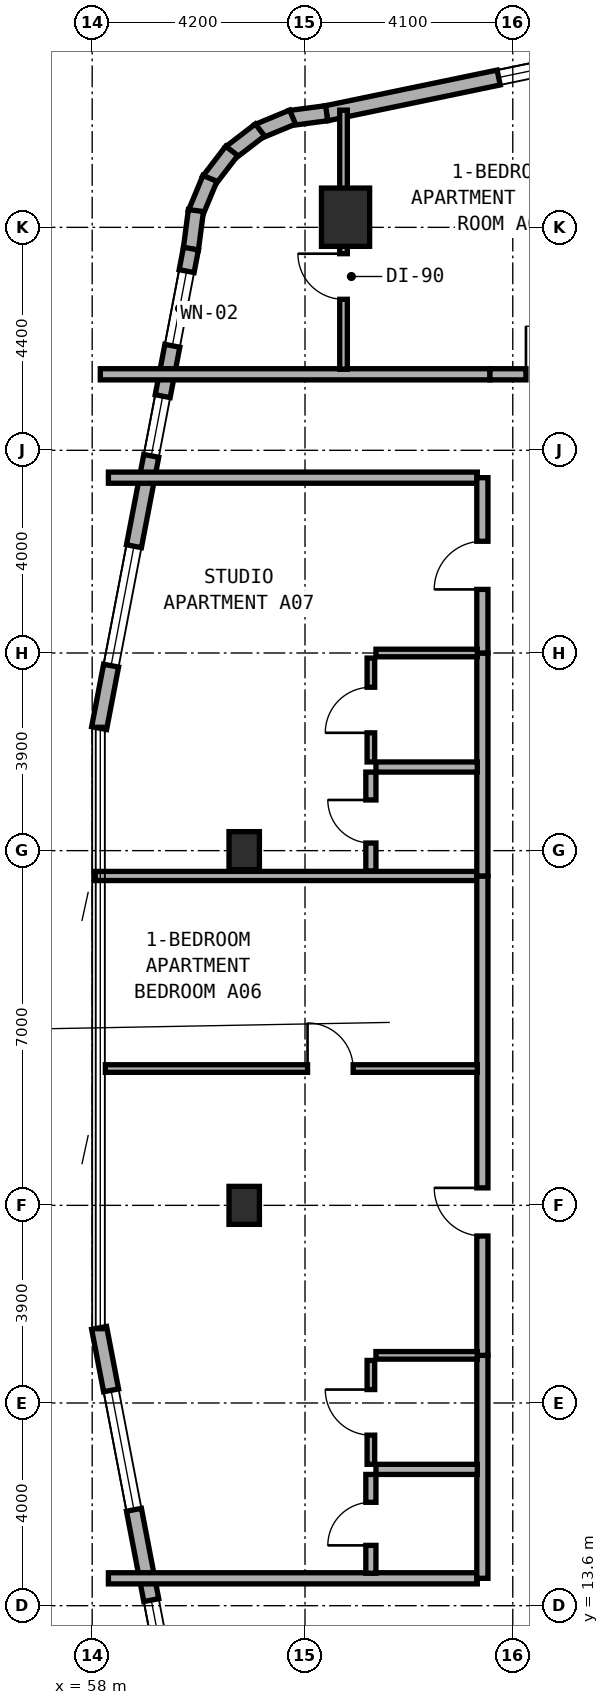
"""IFC4 building model, lengths in metres.
Left out: names, types, materials, properties, quantities, classifications, styles, units other than length and angle.
Written with IfcOpenShell. Run it as: python <this file> out.ifc"""

import sys

from ifc_helpers import new_model, si_unit, direction, frame, frame_2d, origin, origin_2d, place, context, subcontext, project, spatial, rectangle, extrude, element, fill, save


model = new_model("IFC4")
c1 = context("Model", 3, precision=1e-05, world=origin(), true_north=direction((0.0, 1.0)))
c2 = subcontext(c1, "Body", "Model", "MODEL_VIEW")
j1 = project(units=[si_unit("LENGTHUNIT", "METRE"), si_unit("PLANEANGLEUNIT", "RADIAN")], contexts=[c1])
p1 = place(None, origin())
s1 = spatial("IfcSite", under=j1, at=p1, CompositionType="ELEMENT")
p2 = place(p1, origin())
s2 = spatial("IfcBuilding", under=s1, at=p2, CompositionType="ELEMENT")
p3 = place(p2, frame((0.0, 0.0, 73.0)))
s3 = spatial("IfcBuildingStorey", under=s2, at=p3, CompositionType="ELEMENT", Elevation=73.0)
for number, where, z_axis, x_axis in (
    (1, (61.0, 21.5, 0.0), (0.0, 0.0, 1.0), (1.0, 0.0, 0.0)),
    (2, (61.0, 28.5, 0.0), (0.0, 0.0, 1.0), (1.0, 0.0, 0.0)),
):
    element("IfcColumn", number, at=place(p3, frame(where, z_axis=z_axis, x_axis=x_axis)), inside=s3, PredefinedType="COLUMN", context=c2, shape_type="SweptSolid", body=[
        extrude(rectangle(XDim=0.6, YDim=0.75, at=origin_2d()), origin(), (0.0, 0.0, 1.0), 3.5),
    ])
p4 = place(p3, frame((63.0, 41.0, 0.0), z_axis=(0.0, 0.0, 1.0), x_axis=(1.0, 0.0, 0.0)))
e3 = element("IfcColumn", 3, at=p4, inside=s3, PredefinedType="COLUMN", context=c2, shape_type="SweptSolid", body=[
    extrude(rectangle(XDim=0.95, YDim=1.15, at=origin_2d()), origin(), (0.0, 0.0, 1.0), 3.5),
])
p5 = place(p3, frame((71.356, 44.864, 0.0), z_axis=(0.0, 0.0, 1.0), x_axis=(-0.979127260729, -0.203248142175, 0.0)))
e4 = element("IfcWall", 4, at=p5, inside=s3, PredefinedType="STANDARD", context=c2, shape_type="SweptSolid", body=[
    extrude(rectangle(XDim=8.92, YDim=0.3, at=frame_2d((4.46, 0.0))), origin(), (0.0, 0.0, 1.0), 3.25),
])
p6 = place(p5, frame((3.048, 0.0, 0.8)))
e5 = element("IfcOpeningElement", 5, at=p6, cuts=e4, PredefinedType="OPENING", context=c2, shape_type="SweptSolid", body=[
    extrude(rectangle(XDim=2.4, YDim=1.6, at=frame_2d((1.2, 0.8))), frame((0.0, 0.16, 0.0), z_axis=(0.0, -1.0, 0.0), x_axis=(1.0, 0.0, 0.0)), (0.0, 0.0, 1.0), 0.32),
])
p7 = place(p3, frame((62.627, 43.052, 0.0), z_axis=(0.0, 0.0, 1.0), x_axis=(-0.991480488834, -0.130255288807, 0.0)))
e6 = element("IfcWall", 6, at=p7, inside=s3, PredefinedType="STANDARD", context=c2, shape_type="SweptSolid", body=[
    extrude(rectangle(XDim=0.729, YDim=0.3, at=frame_2d((0.365, 0.0))), origin(), (0.0, 0.0, 1.0), 3.25),
])
for number, where, z_axis, x_axis in (
    (7, (61.955, 42.976, 0.0), (0.0, 0.0, 1.0), (-0.924, -0.384, 0.0)),
    (8, (61.311, 42.721, 0.0), (0.0, 0.0, 1.0), (-0.794, -0.608, 0.0)),
    (9, (60.754, 42.309, 0.0), (0.0, 0.0, 1.0), (-0.608, -0.794, 0.0)),
    (10, (60.324, 41.766, 0.0), (0.0, 0.0, 1.0), (-0.383, -0.924, 0.0)),
):
    element("IfcWall", number, at=place(p3, frame(where, z_axis=z_axis, x_axis=x_axis)), inside=s3, PredefinedType="STANDARD", context=c2, shape_type="SweptSolid", body=[
        extrude(rectangle(XDim=0.746, YDim=0.3, at=frame_2d((0.373, 0.0))), origin(), (0.0, 0.0, 1.0), 3.25),
    ])
p8 = place(p3, frame((60.047, 41.131, 0.0), z_axis=(0.0, 0.0, 1.0), x_axis=(-0.129653178221, -0.991559404866, 0.0)))
e11 = element("IfcWall", 11, at=p8, inside=s3, PredefinedType="STANDARD", context=c2, shape_type="SweptSolid", body=[
    extrude(rectangle(XDim=0.764, YDim=0.3, at=frame_2d((0.382, 0.0))), origin(), (0.0, 0.0, 1.0), 3.25),
])
p9 = place(p3, frame((59.949, 40.38, 0.0), z_axis=(0.0, 0.0, 1.0), x_axis=(-0.188087874316, -0.982152203854, 0.0)))
e12 = element("IfcWall", 12, at=p9, inside=s3, PredefinedType="STANDARD", context=c2, shape_type="SweptSolid", body=[
    extrude(rectangle(XDim=9.634, YDim=0.3, at=frame_2d((4.817, 0.0))), origin(), (0.0, 0.0, 1.0), 3.25),
])
p10 = place(p9, frame((0.452, 0.0, 0.85)))
e13 = element("IfcOpeningElement", 13, at=p10, cuts=e12, PredefinedType="OPENING", context=c2, shape_type="SweptSolid", body=[
    extrude(rectangle(XDim=1.5, YDim=1.5, at=frame_2d((0.75, 0.75))), frame((0.0, 0.16, 0.0), z_axis=(0.0, -1.0, 0.0), x_axis=(1.0, 0.0, 0.0)), (0.0, 0.0, 1.0), 0.32),
])
p11 = place(p9, frame((2.964, 0.0, 0.85)))
e14 = element("IfcOpeningElement", 14, at=p11, cuts=e12, PredefinedType="OPENING", context=c2, shape_type="SweptSolid", body=[
    extrude(rectangle(XDim=1.2, YDim=1.5, at=frame_2d((0.6, 0.75))), frame((0.0, 0.16, 0.0), z_axis=(0.0, -1.0, 0.0), x_axis=(1.0, 0.0, 0.0)), (0.0, 0.0, 1.0), 0.32),
])
p12 = place(p9, frame((5.979, 0.0, 0.8)))
e15 = element("IfcOpeningElement", 15, at=p12, cuts=e12, PredefinedType="OPENING", context=c2, shape_type="SweptSolid", body=[
    extrude(rectangle(XDim=2.4, YDim=1.6, at=frame_2d((1.2, 0.8))), frame((0.0, 0.16, 0.0), z_axis=(0.0, -1.0, 0.0), x_axis=(1.0, 0.0, 0.0)), (0.0, 0.0, 1.0), 0.32),
])
p13 = place(p3, frame((58.137, 19.082, 0.0), z_axis=(0.0, 0.0, 1.0), x_axis=(0.188087874316, -0.982152203854, 0.0)))
e16 = element("IfcWall", 16, at=p13, inside=s3, PredefinedType="STANDARD", context=c2, shape_type="SweptSolid", body=[
    extrude(rectangle(XDim=9.634, YDim=0.3, at=frame_2d((4.817, 0.0))), origin(), (0.0, 0.0, 1.0), 3.25),
])
p14 = place(p13, frame((1.255, 0.0, 0.8)))
e17 = element("IfcOpeningElement", 17, at=p14, cuts=e16, PredefinedType="OPENING", context=c2, shape_type="SweptSolid", body=[
    extrude(rectangle(XDim=2.4, YDim=1.6, at=frame_2d((1.2, 0.8))), frame((0.0, 0.16, 0.0), z_axis=(0.0, -1.0, 0.0), x_axis=(1.0, 0.0, 0.0)), (0.0, 0.0, 1.0), 0.32),
])
p15 = place(p13, frame((5.47, 0.0, 0.85)))
e18 = element("IfcOpeningElement", 18, at=p15, cuts=e16, PredefinedType="OPENING", context=c2, shape_type="SweptSolid", body=[
    extrude(rectangle(XDim=1.2, YDim=1.5, at=frame_2d((0.6, 0.75))), frame((0.0, 0.16, 0.0), z_axis=(0.0, -1.0, 0.0), x_axis=(1.0, 0.0, 0.0)), (0.0, 0.0, 1.0), 0.32),
])
p16 = place(p13, frame((7.682, 0.0, 0.85)))
e19 = element("IfcOpeningElement", 19, at=p16, cuts=e16, PredefinedType="OPENING", context=c2, shape_type="SweptSolid", body=[
    extrude(rectangle(XDim=1.5, YDim=1.5, at=frame_2d((0.75, 0.75))), frame((0.0, 0.16, 0.0), z_axis=(0.0, -1.0, 0.0), x_axis=(1.0, 0.0, 0.0)), (0.0, 0.0, 1.0), 0.32),
])
p17 = place(p3, frame((58.16, 37.9, 0.0), z_axis=(0.0, 0.0, 1.0), x_axis=(1.0, 0.0, 0.0)))
e20 = element("IfcWall", 20, at=p17, inside=s3, PredefinedType="SOLIDWALL", context=c2, shape_type="SweptSolid", body=[
    extrude(rectangle(XDim=7.69, YDim=0.22, at=frame_2d((3.845, 0.0))), origin(), (0.0, 0.0, 1.0), 2.865),
])
p18 = place(p3, frame((65.85, 37.9, 0.0), z_axis=(0.0, 0.0, 1.0), x_axis=(1.0, 0.0, 0.0)))
e21 = element("IfcWall", 21, at=p18, inside=s3, PredefinedType="SOLIDWALL", context=c2, shape_type="SweptSolid", body=[
    extrude(rectangle(XDim=2.37, YDim=0.22, at=frame_2d((1.185, 0.0))), origin(), (0.0, 0.0, 1.0), 3.22),
])
p19 = place(p18, frame((0.71, 0.0, 0.0)))
e22 = element("IfcOpeningElement", 22, at=p19, cuts=e21, PredefinedType="OPENING", context=c2, shape_type="SweptSolid", body=[
    extrude(rectangle(XDim=0.95, YDim=2.1, at=frame_2d((0.475, 1.05))), frame((0.0, 0.12, 0.0), z_axis=(0.0, -1.0, 0.0), x_axis=(1.0, 0.0, 0.0)), (0.0, 0.0, 1.0), 0.24),
])
p20 = place(p3, frame((62.96, 38.0, 0.0), z_axis=(0.0, 0.0, 1.0), x_axis=(0.0, 1.0, 0.0)))
e23 = element("IfcWall", 23, at=p20, inside=s3, PredefinedType="PARTITIONING", context=c2, shape_type="SweptSolid", body=[
    extrude(rectangle(XDim=5.113, YDim=0.15, at=frame_2d((2.557, 0.0))), origin(), (0.0, 0.0, 1.0), 2.865),
])
p21 = place(p20, frame((1.38, 0.0, 0.0)))
e24 = element("IfcOpeningElement", 24, at=p21, cuts=e23, PredefinedType="OPENING", context=c2, shape_type="SweptSolid", body=[
    extrude(rectangle(XDim=0.9, YDim=2.1, at=frame_2d((0.45, 1.05))), frame((0.0, 0.085, 0.0), z_axis=(0.0, -1.0, 0.0), x_axis=(1.0, 0.0, 0.0)), (0.0, 0.0, 1.0), 0.17),
])
for number, where, z_axis, x_axis in (
    (25, (58.32, 14.14, 0.0), (0.0, 0.0, 1.0), (1.0, 0.0, 0.0)),
    (26, (58.32, 35.86, 0.0), (0.0, 0.0, 1.0), (1.0, 0.0, 0.0)),
):
    element("IfcWall", number, at=place(p3, frame(where, z_axis=z_axis, x_axis=x_axis)), inside=s3, PredefinedType="SOLIDWALL", context=c2, shape_type="SweptSolid", body=[
        extrude(rectangle(XDim=7.28, YDim=0.22, at=frame_2d((3.64, 0.0))), origin(), (0.0, 0.0, 1.0), 2.865),
    ])
p22 = place(p3, frame((58.06, 28.0, 0.0), z_axis=(0.0, 0.0, 1.0), x_axis=(1.0, 0.0, 0.0)))
e27 = element("IfcWall", 27, at=p22, inside=s3, PredefinedType="SOLIDWALL", context=c2, shape_type="SweptSolid", body=[
    extrude(rectangle(XDim=7.64, YDim=0.18, at=frame_2d((3.82, 0.0))), origin(), (0.0, 0.0, 1.0), 2.865),
])
p23 = place(p3, frame((65.7, 14.14, 0.0), z_axis=(0.0, 0.0, 1.0), x_axis=(0.0, 1.0, 0.0)))
e28 = element("IfcWall", 28, at=p23, inside=s3, PredefinedType="SOLIDWALL", context=c2, shape_type="SweptSolid", body=[
    extrude(rectangle(XDim=4.4, YDim=0.22, at=frame_2d((2.2, 0.0))), origin(), (0.0, 0.0, 1.0), 3.22),
])
p24 = place(p3, frame((65.7, 18.54, 0.0), z_axis=(0.0, 0.0, 1.0), x_axis=(0.0, 1.0, 0.0)))
e29 = element("IfcWall", 29, at=p24, inside=s3, PredefinedType="SOLIDWALL", context=c2, shape_type="SweptSolid", body=[
    extrude(rectangle(XDim=9.46, YDim=0.22, at=frame_2d((4.73, 0.0))), origin(), (0.0, 0.0, 1.0), 2.725),
])
p25 = place(p24, frame((2.355, 0.0, 0.0)))
e30 = element("IfcOpeningElement", 30, at=p25, cuts=e29, PredefinedType="OPENING", context=c2, shape_type="SweptSolid", body=[
    extrude(rectangle(XDim=0.95, YDim=2.1, at=frame_2d((0.475, 1.05))), frame((0.0, 0.12, 0.0), z_axis=(0.0, -1.0, 0.0), x_axis=(1.0, 0.0, 0.0)), (0.0, 0.0, 1.0), 0.24),
])
p26 = place(p3, frame((58.26, 24.2, 0.0), z_axis=(0.0, 0.0, 1.0), x_axis=(1.0, 0.0, 0.0)))
e31 = element("IfcWall", 31, at=p26, inside=s3, PredefinedType="PARTITIONING", context=c2, shape_type="SweptSolid", body=[
    extrude(rectangle(XDim=7.34, YDim=0.15, at=frame_2d((3.67, 0.0))), origin(), (0.0, 0.0, 1.0), 2.865),
])
p27 = place(p26, frame((3.99, 0.0, 0.0)))
e32 = element("IfcOpeningElement", 32, at=p27, cuts=e31, PredefinedType="OPENING", context=c2, shape_type="SweptSolid", body=[
    extrude(rectangle(XDim=0.9, YDim=2.1, at=frame_2d((0.45, 1.05))), frame((0.0, 0.085, 0.0), z_axis=(0.0, -1.0, 0.0), x_axis=(1.0, 0.0, 0.0)), (0.0, 0.0, 1.0), 0.17),
])
p28 = place(p3, frame((63.6, 16.29, 0.0), z_axis=(0.0, 0.0, 1.0), x_axis=(1.0, 0.0, 0.0)))
e33 = element("IfcWall", 33, at=p28, inside=s3, PredefinedType="PLUMBINGWALL", context=c2, shape_type="SweptSolid", body=[
    extrude(rectangle(XDim=2.0, YDim=0.2, at=frame_2d((1.0, 0.0))), origin(), (0.0, 0.0, 1.0), 3.22),
])
p29 = place(p3, frame((63.6, 18.54, 0.0), z_axis=(0.0, 0.0, 1.0), x_axis=(1.0, 0.0, 0.0)))
e34 = element("IfcWall", 34, at=p29, inside=s3, PredefinedType="PARTITIONING", context=c2, shape_type="SweptSolid", body=[
    extrude(rectangle(XDim=2.0, YDim=0.15, at=frame_2d((1.0, 0.0))), origin(), (0.0, 0.0, 1.0), 3.22),
])
p30 = place(p3, frame((63.5, 14.24, 0.0), z_axis=(0.0, 0.0, 1.0), x_axis=(0.0, 1.0, 0.0)))
e35 = element("IfcWall", 35, at=p30, inside=s3, PredefinedType="PLUMBINGWALL", context=c2, shape_type="SweptSolid", body=[
    extrude(rectangle(XDim=1.95, YDim=0.2, at=frame_2d((0.975, 0.0))), origin(), (0.0, 0.0, 1.0), 3.22),
])
p31 = place(p30, frame((0.55, 0.0, 0.0)))
e36 = element("IfcOpeningElement", 36, at=p31, cuts=e35, PredefinedType="OPENING", context=c2, shape_type="SweptSolid", body=[
    extrude(rectangle(XDim=0.85, YDim=2.1, at=frame_2d((0.425, 1.05))), frame((0.0, 0.11, 0.0), z_axis=(0.0, -1.0, 0.0), x_axis=(1.0, 0.0, 0.0)), (0.0, 0.0, 1.0), 0.22),
])
p32 = place(p3, frame((63.5, 16.39, 0.0), z_axis=(0.0, 0.0, 1.0), x_axis=(0.0, 1.0, 0.0)))
e37 = element("IfcWall", 37, at=p32, inside=s3, PredefinedType="PARTITIONING", context=c2, shape_type="SweptSolid", body=[
    extrude(rectangle(XDim=2.05, YDim=0.15, at=frame_2d((1.025, 0.0))), origin(), (0.0, 0.0, 1.0), 3.22),
])
p33 = place(p32, frame((0.575, 0.0, 0.0)))
e38 = element("IfcOpeningElement", 38, at=p33, cuts=e37, PredefinedType="OPENING", context=c2, shape_type="SweptSolid", body=[
    extrude(rectangle(XDim=0.9, YDim=2.1, at=frame_2d((0.45, 1.05))), frame((0.0, 0.085, 0.0), z_axis=(0.0, -1.0, 0.0), x_axis=(1.0, 0.0, 0.0)), (0.0, 0.0, 1.0), 0.17),
])
p34 = place(p3, frame((65.7, 28.0, 0.0), z_axis=(0.0, 0.0, 1.0), x_axis=(0.0, 1.0, 0.0)))
e39 = element("IfcWall", 39, at=p34, inside=s3, PredefinedType="SOLIDWALL", context=c2, shape_type="SweptSolid", body=[
    extrude(rectangle(XDim=4.4, YDim=0.22, at=frame_2d((2.2, 0.0))), origin(), (0.0, 0.0, 1.0), 2.725),
])
p35 = place(p3, frame((65.7, 32.4, 0.0), z_axis=(0.0, 0.0, 1.0), x_axis=(0.0, 1.0, 0.0)))
e40 = element("IfcWall", 40, at=p35, inside=s3, PredefinedType="SOLIDWALL", context=c2, shape_type="SweptSolid", body=[
    extrude(rectangle(XDim=3.46, YDim=0.22, at=frame_2d((1.73, 0.0))), origin(), (0.0, 0.0, 1.0), 3.22),
])
p36 = place(p35, frame((1.255, 0.0, 0.0)))
e41 = element("IfcOpeningElement", 41, at=p36, cuts=e40, PredefinedType="OPENING", context=c2, shape_type="SweptSolid", body=[
    extrude(rectangle(XDim=0.95, YDim=2.1, at=frame_2d((0.475, 1.05))), frame((0.0, 0.12, 0.0), z_axis=(0.0, -1.0, 0.0), x_axis=(1.0, 0.0, 0.0)), (0.0, 0.0, 1.0), 0.24),
])
p37 = place(p3, frame((63.6, 30.15, 0.0), z_axis=(0.0, 0.0, 1.0), x_axis=(1.0, 0.0, 0.0)))
e42 = element("IfcWall", 42, at=p37, inside=s3, PredefinedType="PLUMBINGWALL", context=c2, shape_type="SweptSolid", body=[
    extrude(rectangle(XDim=2.0, YDim=0.2, at=frame_2d((1.0, 0.0))), origin(), (0.0, 0.0, 1.0), 3.22),
])
p38 = place(p3, frame((63.6, 32.4, 0.0), z_axis=(0.0, 0.0, 1.0), x_axis=(1.0, 0.0, 0.0)))
e43 = element("IfcWall", 43, at=p38, inside=s3, PredefinedType="PARTITIONING", context=c2, shape_type="SweptSolid", body=[
    extrude(rectangle(XDim=2.0, YDim=0.15, at=frame_2d((1.0, 0.0))), origin(), (0.0, 0.0, 1.0), 3.22),
])
p39 = place(p3, frame((63.5, 28.1, 0.0), z_axis=(0.0, 0.0, 1.0), x_axis=(0.0, 1.0, 0.0)))
e44 = element("IfcWall", 44, at=p39, inside=s3, PredefinedType="PLUMBINGWALL", context=c2, shape_type="SweptSolid", body=[
    extrude(rectangle(XDim=1.95, YDim=0.2, at=frame_2d((0.975, 0.0))), origin(), (0.0, 0.0, 1.0), 2.725),
])
p40 = place(p39, frame((0.55, 0.0, 0.0)))
e45 = element("IfcOpeningElement", 45, at=p40, cuts=e44, PredefinedType="OPENING", context=c2, shape_type="SweptSolid", body=[
    extrude(rectangle(XDim=0.85, YDim=2.1, at=frame_2d((0.425, 1.05))), frame((0.0, 0.11, 0.0), z_axis=(0.0, -1.0, 0.0), x_axis=(1.0, 0.0, 0.0)), (0.0, 0.0, 1.0), 0.22),
])
p41 = place(p3, frame((63.5, 30.25, 0.0), z_axis=(0.0, 0.0, 1.0), x_axis=(0.0, 1.0, 0.0)))
e46 = element("IfcWall", 46, at=p41, inside=s3, PredefinedType="PARTITIONING", context=c2, shape_type="SweptSolid", body=[
    extrude(rectangle(XDim=2.05, YDim=0.15, at=frame_2d((1.025, 0.0))), origin(), (0.0, 0.0, 1.0), 3.22),
])
p42 = place(p41, frame((0.575, 0.0, 0.0)))
e47 = element("IfcOpeningElement", 47, at=p42, cuts=e46, PredefinedType="OPENING", context=c2, shape_type="SweptSolid", body=[
    extrude(rectangle(XDim=0.9, YDim=2.1, at=frame_2d((0.45, 1.05))), frame((0.0, 0.085, 0.0), z_axis=(0.0, -1.0, 0.0), x_axis=(1.0, 0.0, 0.0)), (0.0, 0.0, 1.0), 0.17),
])
p43 = place(p6, origin())
e48 = element("IfcWindow", 48, at=p43, inside=s3, PartitioningType="SINGLE_PANEL", PredefinedType="WINDOW", context=c2, shape_type="SweptSolid", body=[
    extrude(rectangle(XDim=2.4, YDim=1.6, at=frame_2d((1.2, 0.8))), frame((0.0, 0.03, 0.0), z_axis=(0.0, -1.0, 0.0), x_axis=(1.0, 0.0, 0.0)), (0.0, 0.0, 1.0), 0.06),
])
fill(e5, e48)
p44 = place(p10, origin())
e49 = element("IfcWindow", 49, at=p44, inside=s3, PartitioningType="SINGLE_PANEL", PredefinedType="WINDOW", context=c2, shape_type="SweptSolid", body=[
    extrude(rectangle(XDim=1.5, YDim=1.5, at=frame_2d((0.75, 0.75))), frame((0.0, 0.03, 0.0), z_axis=(0.0, -1.0, 0.0), x_axis=(1.0, 0.0, 0.0)), (0.0, 0.0, 1.0), 0.06),
])
fill(e13, e49)
p45 = place(p11, origin())
e50 = element("IfcWindow", 50, at=p45, inside=s3, PartitioningType="SINGLE_PANEL", PredefinedType="WINDOW", context=c2, shape_type="SweptSolid", body=[
    extrude(rectangle(XDim=1.2, YDim=1.5, at=frame_2d((0.6, 0.75))), frame((0.0, 0.03, 0.0), z_axis=(0.0, -1.0, 0.0), x_axis=(1.0, 0.0, 0.0)), (0.0, 0.0, 1.0), 0.06),
])
fill(e14, e50)
p46 = place(p12, origin())
e51 = element("IfcWindow", 51, at=p46, inside=s3, PartitioningType="SINGLE_PANEL", PredefinedType="WINDOW", context=c2, shape_type="SweptSolid", body=[
    extrude(rectangle(XDim=2.4, YDim=1.6, at=frame_2d((1.2, 0.8))), frame((0.0, 0.03, 0.0), z_axis=(0.0, -1.0, 0.0), x_axis=(1.0, 0.0, 0.0)), (0.0, 0.0, 1.0), 0.06),
])
fill(e15, e51)
p47 = place(p14, origin())
e52 = element("IfcWindow", 52, at=p47, inside=s3, PartitioningType="SINGLE_PANEL", PredefinedType="WINDOW", context=c2, shape_type="SweptSolid", body=[
    extrude(rectangle(XDim=2.4, YDim=1.6, at=frame_2d((1.2, 0.8))), frame((0.0, 0.03, 0.0), z_axis=(0.0, -1.0, 0.0), x_axis=(1.0, 0.0, 0.0)), (0.0, 0.0, 1.0), 0.06),
])
fill(e17, e52)
p48 = place(p15, origin())
e53 = element("IfcWindow", 53, at=p48, inside=s3, PartitioningType="SINGLE_PANEL", PredefinedType="WINDOW", context=c2, shape_type="SweptSolid", body=[
    extrude(rectangle(XDim=1.2, YDim=1.5, at=frame_2d((0.6, 0.75))), frame((0.0, 0.03, 0.0), z_axis=(0.0, -1.0, 0.0), x_axis=(1.0, 0.0, 0.0)), (0.0, 0.0, 1.0), 0.06),
])
fill(e18, e53)
p49 = place(p19, origin())
e54 = element("IfcDoor", 54, at=p49, inside=s3, OperationType="SINGLE_SWING_LEFT", PredefinedType="DOOR", context=c2, shape_type="SweptSolid", body=[
    extrude(rectangle(XDim=0.95, YDim=2.1, at=frame_2d((0.475, 1.05))), frame((0.0, 0.025, 0.0), z_axis=(0.0, -1.0, 0.0), x_axis=(1.0, 0.0, 0.0)), (0.0, 0.0, 1.0), 0.05),
])
fill(e22, e54)
p50 = place(p21, origin())
e55 = element("IfcDoor", 55, at=p50, inside=s3, OperationType="SINGLE_SWING_RIGHT", PredefinedType="DOOR", context=c2, shape_type="SweptSolid", body=[
    extrude(rectangle(XDim=0.9, YDim=2.1, at=frame_2d((0.45, 1.05))), frame((0.0, 0.025, 0.0), z_axis=(0.0, -1.0, 0.0), x_axis=(1.0, 0.0, 0.0)), (0.0, 0.0, 1.0), 0.05),
])
fill(e24, e55)
p51 = place(p25, origin())
e56 = element("IfcDoor", 56, at=p51, inside=s3, OperationType="SINGLE_SWING_RIGHT", PredefinedType="DOOR", context=c2, shape_type="SweptSolid", body=[
    extrude(rectangle(XDim=0.95, YDim=2.1, at=frame_2d((0.475, 1.05))), frame((0.0, 0.025, 0.0), z_axis=(0.0, -1.0, 0.0), x_axis=(1.0, 0.0, 0.0)), (0.0, 0.0, 1.0), 0.05),
])
fill(e30, e56)
p52 = place(p27, origin())
e57 = element("IfcDoor", 57, at=p52, inside=s3, OperationType="SINGLE_SWING_LEFT", PredefinedType="DOOR", context=c2, shape_type="SweptSolid", body=[
    extrude(rectangle(XDim=0.9, YDim=2.1, at=frame_2d((0.45, 1.05))), frame((0.0, 0.025, 0.0), z_axis=(0.0, -1.0, 0.0), x_axis=(1.0, 0.0, 0.0)), (0.0, 0.0, 1.0), 0.05),
])
fill(e32, e57)
p53 = place(p31, origin())
e58 = element("IfcDoor", 58, at=p53, inside=s3, OperationType="SINGLE_SWING_LEFT", PredefinedType="DOOR", context=c2, shape_type="SweptSolid", body=[
    extrude(rectangle(XDim=0.85, YDim=2.1, at=frame_2d((0.425, 1.05))), frame((0.0, 0.025, 0.0), z_axis=(0.0, -1.0, 0.0), x_axis=(1.0, 0.0, 0.0)), (0.0, 0.0, 1.0), 0.05),
])
fill(e36, e58)
p54 = place(p33, origin())
e59 = element("IfcDoor", 59, at=p54, inside=s3, OperationType="SINGLE_SWING_RIGHT", PredefinedType="DOOR", context=c2, shape_type="SweptSolid", body=[
    extrude(rectangle(XDim=0.9, YDim=2.1, at=frame_2d((0.45, 1.05))), frame((0.0, 0.025, 0.0), z_axis=(0.0, -1.0, 0.0), x_axis=(1.0, 0.0, 0.0)), (0.0, 0.0, 1.0), 0.05),
])
fill(e38, e59)
p55 = place(p36, origin())
e60 = element("IfcDoor", 60, at=p55, inside=s3, OperationType="SINGLE_SWING_LEFT", PredefinedType="DOOR", context=c2, shape_type="SweptSolid", body=[
    extrude(rectangle(XDim=0.95, YDim=2.1, at=frame_2d((0.475, 1.05))), frame((0.0, 0.025, 0.0), z_axis=(0.0, -1.0, 0.0), x_axis=(1.0, 0.0, 0.0)), (0.0, 0.0, 1.0), 0.05),
])
fill(e41, e60)
p56 = place(p40, origin())
e61 = element("IfcDoor", 61, at=p56, inside=s3, OperationType="SINGLE_SWING_RIGHT", PredefinedType="DOOR", context=c2, shape_type="SweptSolid", body=[
    extrude(rectangle(XDim=0.85, YDim=2.1, at=frame_2d((0.425, 1.05))), frame((0.0, 0.025, 0.0), z_axis=(0.0, -1.0, 0.0), x_axis=(1.0, 0.0, 0.0)), (0.0, 0.0, 1.0), 0.05),
])
fill(e45, e61)
p57 = place(p42, origin())
e62 = element("IfcDoor", 62, at=p57, inside=s3, OperationType="SINGLE_SWING_LEFT", PredefinedType="DOOR", context=c2, shape_type="SweptSolid", body=[
    extrude(rectangle(XDim=0.9, YDim=2.1, at=frame_2d((0.45, 1.05))), frame((0.0, 0.025, 0.0), z_axis=(0.0, -1.0, 0.0), x_axis=(1.0, 0.0, 0.0)), (0.0, 0.0, 1.0), 0.05),
])
fill(e47, e62)
save(model, sys.argv[1])
